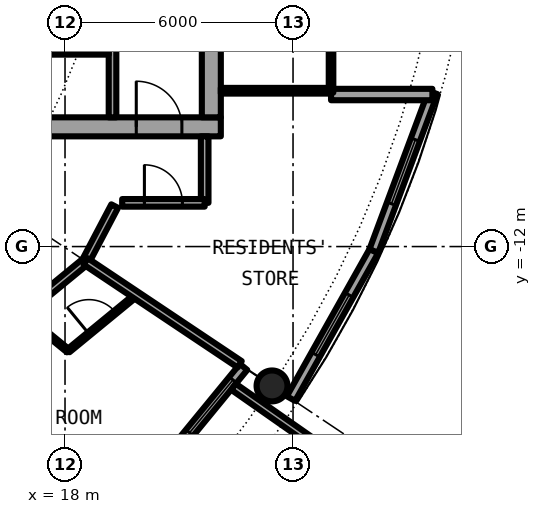
"""IFC4 building model, lengths in metres.
Left out: names, types, materials, properties, quantities, classifications, styles, units other than length and angle.
Written with IfcOpenShell. Run it as: python <this file> out.ifc"""

import sys

from ifc_helpers import new_model, si_unit, direction, frame, frame_2d, origin, origin_2d, place, context, subcontext, project, spatial, rectangle, hollow_circle, extrude, element, fill, save


model = new_model("IFC4")
c1 = context("Model", 3, precision=1e-05, world=origin(), true_north=direction((0.0, 1.0)))
c2 = subcontext(c1, "Body", "Model", "MODEL_VIEW")
j1 = project(units=[si_unit("LENGTHUNIT", "METRE"), si_unit("PLANEANGLEUNIT", "RADIAN")], contexts=[c1])
p1 = place(None, origin())
s1 = spatial("IfcSite", under=j1, at=p1, CompositionType="ELEMENT")
p2 = place(p1, origin())
s2 = spatial("IfcBuilding", under=s1, at=p2, CompositionType="ELEMENT")
p3 = place(p2, frame((0.0, 0.0, 154.35)))
s3 = spatial("IfcBuildingStorey", under=s2, at=p3, CompositionType="ELEMENT", Elevation=154.35)
p4 = place(p3, frame((23.448, -15.667, 0.0), z_axis=(0.0, 0.0, 1.0), x_axis=(1.0, 0.0, 0.0)))
e1 = element("IfcColumn", 1, at=p4, inside=s3, PredefinedType="COLUMN", context=c2, shape_type="SweptSolid", body=[
    extrude(hollow_circle(Radius=0.406, WallThickness=0.04, at=origin_2d()), origin(), (0.0, 0.0, 1.0), 3.05),
])
p5 = place(p3, frame((19.304, -19.304, 0.0), z_axis=(0.0, 0.0, 1.0), x_axis=(0.634382322723, 0.773019449054, 0.0)))
e2 = element("IfcWall", 2, at=p5, inside=s3, PredefinedType="SOLIDWALL", context=c2, shape_type="SweptSolid", body=[
    extrude(rectangle(XDim=5.352, YDim=0.25, at=frame_2d((2.676, 0.0))), origin(), (0.0, 0.0, 1.0), 2.7),
])
p6 = place(p5, frame((0.841, 0.0, 0.0)))
e3 = element("IfcOpeningElement", 3, at=p6, cuts=e2, PredefinedType="OPENING", context=c2, shape_type="SweptSolid", body=[
    extrude(rectangle(XDim=1.0, YDim=2.2, at=frame_2d((0.5, 1.1))), frame((0.0, 0.135, 0.0), z_axis=(0.0, -1.0, 0.0), x_axis=(1.0, 0.0, 0.0)), (0.0, 0.0, 1.0), 0.27),
])
p7 = place(p5, frame((3.111, 0.0, 0.3)))
e4 = element("IfcOpeningElement", 4, at=p7, cuts=e2, PredefinedType="OPENING", context=c2, shape_type="SweptSolid", body=[
    extrude(rectangle(XDim=1.8, YDim=2.1, at=frame_2d((0.9, 1.05))), frame((0.0, 0.135, 0.0), z_axis=(0.0, -1.0, 0.0), x_axis=(1.0, 0.0, 0.0)), (0.0, 0.0, 1.0), 0.27),
])
p8 = place(p3, frame((22.433, -15.688, -0.03), z_axis=(0.0, 0.0, 1.0), x_axis=(0.819373043115, -0.573260687834, 0.0)))
e5 = element("IfcWall", 5, at=p8, inside=s3, PredefinedType="SOLIDWALL", context=c2, shape_type="SweptSolid", body=[
    extrude(rectangle(XDim=2.925, YDim=0.2, at=frame_2d((1.463, 0.0))), origin(), (0.0, 0.0, 1.0), 2.73),
])
p9 = place(p3, frame((23.946, -16.0, 0.0), z_axis=(0.0, 0.0, 1.0), x_axis=(0.489696356642, 0.871893042919, 0.0)))
e6 = element("IfcWall", 6, at=p9, inside=s3, PredefinedType="SOLIDWALL", context=c2, shape_type="SweptSolid", body=[
    extrude(rectangle(XDim=4.454, YDim=0.25, at=frame_2d((2.227, 0.0))), origin(), (0.0, 0.0, 1.0), 2.7),
])
p10 = place(p9, frame((1.327, 0.0, 0.3)))
e7 = element("IfcOpeningElement", 7, at=p10, cuts=e6, PredefinedType="OPENING", context=c2, shape_type="SweptSolid", body=[
    extrude(rectangle(XDim=1.8, YDim=2.1, at=frame_2d((0.9, 1.05))), frame((0.0, 0.135, 0.0), z_axis=(0.0, -1.0, 0.0), x_axis=(1.0, 0.0, 0.0)), (0.0, 0.0, 1.0), 0.27),
])
p11 = place(p3, frame((26.127, -12.117, 0.0), z_axis=(0.0, 0.0, 1.0), x_axis=(0.349247811493, 0.937030397675, 0.0)))
e8 = element("IfcWall", 8, at=p11, inside=s3, PredefinedType="SOLIDWALL", context=c2, shape_type="SweptSolid", body=[
    extrude(rectangle(XDim=4.452, YDim=0.25, at=frame_2d((2.226, 0.0))), origin(), (0.0, 0.0, 1.0), 2.7),
])
p12 = place(p11, frame((1.327, 0.0, 0.3)))
e9 = element("IfcOpeningElement", 9, at=p12, cuts=e8, PredefinedType="OPENING", context=c2, shape_type="SweptSolid", body=[
    extrude(rectangle(XDim=1.8, YDim=2.1, at=frame_2d((0.9, 1.05))), frame((0.0, 0.135, 0.0), z_axis=(0.0, -1.0, 0.0), x_axis=(1.0, 0.0, 0.0)), (0.0, 0.0, 1.0), 0.27),
])
p13 = place(p3, frame((25.0, -8.0, 0.0), z_axis=(0.0, 0.0, 1.0), x_axis=(1.0, 0.0, 0.0)))
e10 = element("IfcWall", 10, at=p13, inside=s3, PredefinedType="SOLIDWALL", context=c2, shape_type="SweptSolid", body=[
    extrude(rectangle(XDim=2.667, YDim=0.3, at=frame_2d((1.333, 0.0))), origin(), (0.0, 0.0, 1.0), 2.7),
])
p14 = place(p3, frame((8.5, -8.85, 0.0), z_axis=(0.0, 0.0, 1.0), x_axis=(1.0, 0.0, 0.0)))
e11 = element("IfcWall", 11, at=p14, inside=s3, PredefinedType="SHEAR", context=c2, shape_type="SweptSolid", body=[
    extrude(rectangle(XDim=13.6, YDim=0.5, at=frame_2d((6.8, 0.0))), origin(), (0.0, 0.0, 1.0), 3.05),
])
p15 = place(p14, frame((11.375, 0.0, 0.0)))
e12 = element("IfcOpeningElement", 12, at=p15, cuts=e11, PredefinedType="OPENING", context=c2, shape_type="SweptSolid", body=[
    extrude(rectangle(XDim=1.2, YDim=2.3, at=frame_2d((0.6, 1.15))), frame((0.0, 0.26, 0.0), z_axis=(0.0, -1.0, 0.0), x_axis=(1.0, 0.0, 0.0)), (0.0, 0.0, 1.0), 0.52),
])
p16 = place(p3, frame((21.85, 8.6, 0.0), z_axis=(0.0, 0.0, 1.0), x_axis=(0.0, -1.0, 0.0)))
e13 = element("IfcWall", 13, at=p16, inside=s3, PredefinedType="SHEAR", context=c2, shape_type="SweptSolid", body=[
    extrude(rectangle(XDim=17.2, YDim=0.5, at=frame_2d((8.6, 0.0))), origin(), (0.0, 0.0, 1.0), 3.05),
])
p17 = place(p16, frame((7.7, 0.0, 0.0)))
e14 = element("IfcOpeningElement", 14, at=p17, cuts=e13, PredefinedType="OPENING", context=c2, shape_type="SweptSolid", body=[
    extrude(rectangle(XDim=1.8, YDim=2.3, at=frame_2d((0.9, 1.15))), frame((0.0, 0.26, 0.0), z_axis=(0.0, -1.0, 0.0), x_axis=(1.0, 0.0, 0.0)), (0.0, 0.0, 1.0), 0.52),
])
p18 = place(p3, frame((19.25, -8.6, 0.0), z_axis=(0.0, 0.0, 1.0), x_axis=(0.0, 1.0, 0.0)))
e15 = element("IfcWall", 15, at=p18, inside=s3, PredefinedType="SOLIDWALL", context=c2, shape_type="SweptSolid", body=[
    extrude(rectangle(XDim=7.025, YDim=0.2, at=frame_2d((3.513, 0.0))), origin(), (0.0, 0.0, 1.0), 2.7),
])
p19 = place(p18, frame((2.35, 0.0, 0.0)))
e16 = element("IfcOpeningElement", 16, at=p19, cuts=e15, PredefinedType="OPENING", context=c2, shape_type="SweptSolid", body=[
    extrude(rectangle(XDim=1.1, YDim=2.3, at=frame_2d((0.55, 1.15))), frame((0.0, 0.11, 0.0), z_axis=(0.0, -1.0, 0.0), x_axis=(1.0, 0.0, 0.0)), (0.0, 0.0, 1.0), 0.22),
])
p20 = place(p3, frame((15.45, -6.875, 0.0), z_axis=(0.0, 0.0, 1.0), x_axis=(1.0, 0.0, 0.0)))
e17 = element("IfcWall", 17, at=p20, inside=s3, PredefinedType="PARTITIONING", context=c2, shape_type="SweptSolid", body=[
    extrude(rectangle(XDim=3.7, YDim=0.15, at=frame_2d((1.85, 0.0))), origin(), (0.0, 0.0, 1.0), 2.7),
])
p21 = place(p20, frame((1.4, 0.0, 0.0)))
e18 = element("IfcOpeningElement", 18, at=p21, cuts=e17, PredefinedType="OPENING", context=c2, shape_type="SweptSolid", body=[
    extrude(rectangle(XDim=0.9, YDim=2.3, at=frame_2d((0.45, 1.15))), frame((0.0, 0.085, 0.0), z_axis=(0.0, -1.0, 0.0), x_axis=(1.0, 0.0, 0.0)), (0.0, 0.0, 1.0), 0.17),
])
p22 = place(p3, frame((22.1, -7.9, 0.0), z_axis=(0.0, 0.0, 1.0), x_axis=(1.0, 0.0, 0.0)))
e19 = element("IfcWall", 19, at=p22, inside=s3, PredefinedType="PARTITIONING", context=c2, shape_type="SweptSolid", body=[
    extrude(rectangle(XDim=2.84, YDim=0.15, at=frame_2d((1.42, 0.0))), origin(), (0.0, 0.0, 1.0), 2.7),
])
p23 = place(p3, frame((25.0, -7.95, 0.0), z_axis=(0.0, 0.0, 1.0), x_axis=(0.0, 1.0, 0.0)))
e20 = element("IfcWall", 20, at=p23, inside=s3, PredefinedType="PARTITIONING", context=c2, shape_type="SweptSolid", body=[
    extrude(rectangle(XDim=15.9, YDim=0.12, at=frame_2d((7.95, 0.0))), origin(), (0.0, 0.0, 1.0), 2.7),
])
p24 = place(p23, frame((0.95, 0.0, 0.1)))
e21 = element("IfcOpeningElement", 21, at=p24, cuts=e20, PredefinedType="OPENING", context=c2, shape_type="SweptSolid", body=[
    extrude(rectangle(XDim=14.0, YDim=2.35, at=frame_2d((7.0, 1.175))), frame((0.0, 0.07, 0.0), z_axis=(0.0, -1.0, 0.0), x_axis=(1.0, 0.0, 0.0)), (0.0, 0.0, 1.0), 0.14),
])
p25 = place(p3, frame((18.087, -14.742, 0.0), z_axis=(0.0, 0.0, 1.0), x_axis=(0.77288890179, 0.634541366256, 0.0)))
e22 = element("IfcWall", 22, at=p25, inside=s3, PredefinedType="PARTITIONING", context=c2, shape_type="SweptSolid", body=[
    extrude(rectangle(XDim=2.313, YDim=0.1, at=frame_2d((1.157, 0.0))), origin(), (0.0, 0.0, 1.0), 2.7),
])
p26 = place(p25, frame((0.702, 0.0, 0.0)))
e23 = element("IfcOpeningElement", 23, at=p26, cuts=e22, PredefinedType="OPENING", context=c2, shape_type="SweptSolid", body=[
    extrude(rectangle(XDim=0.9, YDim=2.3, at=frame_2d((0.45, 1.15))), frame((0.0, 0.06, 0.0), z_axis=(0.0, -1.0, 0.0), x_axis=(1.0, 0.0, 0.0)), (0.0, 0.0, 1.0), 0.12),
])
p27 = place(p3, frame((18.542, -12.389, 0.0), z_axis=(0.0, 0.0, 1.0), x_axis=(0.465605550524, 0.884992356646, 0.0)))
e24 = element("IfcWall", 24, at=p27, inside=s3, PredefinedType="PARTITIONING", context=c2, shape_type="SweptSolid", body=[
    extrude(rectangle(XDim=1.643, YDim=0.2, at=frame_2d((0.821, 0.0))), origin(), (0.0, 0.0, 1.0), 2.7),
])
p28 = place(p3, frame((21.675, -10.85, 0.0), z_axis=(0.0, 0.0, 1.0), x_axis=(0.0, 1.0, 0.0)))
e25 = element("IfcWall", 25, at=p28, inside=s3, PredefinedType="PARTITIONING", context=c2, shape_type="SweptSolid", body=[
    extrude(rectangle(XDim=1.75, YDim=0.2, at=frame_2d((0.875, 0.0))), origin(), (0.0, 0.0, 1.0), 2.7),
])
p29 = place(p3, frame((8.534, -20.603, 0.0), z_axis=(0.0, 0.0, 1.0), x_axis=(0.772983503654, 0.634426121056, 0.0)))
e26 = element("IfcWall", 26, at=p29, inside=s3, PredefinedType="PARTITIONING", context=c2, shape_type="SweptSolid", body=[
    extrude(rectangle(XDim=12.947, YDim=0.2, at=frame_2d((6.474, 0.0))), origin(), (0.0, 0.0, 1.0), 2.7),
])
p30 = place(p29, frame((4.895, 0.0, 0.0)))
e27 = element("IfcOpeningElement", 27, at=p30, cuts=e26, PredefinedType="OPENING", context=c2, shape_type="SweptSolid", body=[
    extrude(rectangle(XDim=1.0, YDim=2.3, at=frame_2d((0.5, 1.15))), frame((0.0, 0.11, 0.0), z_axis=(0.0, -1.0, 0.0), x_axis=(1.0, 0.0, 0.0)), (0.0, 0.0, 1.0), 0.22),
])
p31 = place(p3, frame((19.504, -10.85, 0.0), z_axis=(0.0, 0.0, 1.0), x_axis=(1.0, 0.0, 0.0)))
e28 = element("IfcWall", 28, at=p31, inside=s3, PredefinedType="PARTITIONING", context=c2, shape_type="SweptSolid", body=[
    extrude(rectangle(XDim=2.171, YDim=0.2, at=frame_2d((1.085, 0.0))), origin(), (0.0, 0.0, 1.0), 2.7),
])
p32 = place(p31, frame((0.585, 0.0, 0.0)))
e29 = element("IfcOpeningElement", 29, at=p32, cuts=e28, PredefinedType="OPENING", context=c2, shape_type="SweptSolid", body=[
    extrude(rectangle(XDim=1.0, YDim=2.3, at=frame_2d((0.5, 1.15))), frame((0.0, 0.11, 0.0), z_axis=(0.0, -1.0, 0.0), x_axis=(1.0, 0.0, 0.0)), (0.0, 0.0, 1.0), 0.22),
])
p33 = place(p3, frame((16.874, -13.758, 0.0), z_axis=(0.0, 0.0, 1.0), x_axis=(0.774869051393, -0.632121786679, 0.0)))
e30 = element("IfcWall", 30, at=p33, inside=s3, PredefinedType="PARTITIONING", context=c2, shape_type="SweptSolid", body=[
    extrude(rectangle(XDim=1.562, YDim=0.1, at=frame_2d((0.781, 0.0))), origin(), (0.0, 0.0, 1.0), 2.7),
])
p34 = place(p3, frame((18.542, -12.389, 0.0), z_axis=(0.0, 0.0, 1.0), x_axis=(0.831387096605, -0.55569370664, 0.0)))
e31 = element("IfcWall", 31, at=p34, inside=s3, PredefinedType="PARTITIONING", context=c2, shape_type="SweptSolid", body=[
    extrude(rectangle(XDim=4.875, YDim=0.2, at=frame_2d((2.438, 0.0))), origin(), (0.0, 0.0, 1.0), 2.7),
])
p35 = place(p7, origin())
e32 = element("IfcWindow", 32, at=p35, inside=s3, PartitioningType="SINGLE_PANEL", PredefinedType="WINDOW", context=c2, shape_type="SweptSolid", body=[
    extrude(rectangle(XDim=1.8, YDim=2.1, at=frame_2d((0.9, 1.05))), frame((0.0, 0.03, 0.0), z_axis=(0.0, -1.0, 0.0), x_axis=(1.0, 0.0, 0.0)), (0.0, 0.0, 1.0), 0.06),
])
fill(e4, e32)
p36 = place(p10, origin())
e33 = element("IfcWindow", 33, at=p36, inside=s3, PartitioningType="SINGLE_PANEL", PredefinedType="WINDOW", context=c2, shape_type="SweptSolid", body=[
    extrude(rectangle(XDim=1.8, YDim=2.1, at=frame_2d((0.9, 1.05))), frame((0.0, 0.03, 0.0), z_axis=(0.0, -1.0, 0.0), x_axis=(1.0, 0.0, 0.0)), (0.0, 0.0, 1.0), 0.06),
])
fill(e7, e33)
p37 = place(p12, origin())
e34 = element("IfcWindow", 34, at=p37, inside=s3, PartitioningType="SINGLE_PANEL", PredefinedType="WINDOW", context=c2, shape_type="SweptSolid", body=[
    extrude(rectangle(XDim=1.8, YDim=2.1, at=frame_2d((0.9, 1.05))), frame((0.0, 0.03, 0.0), z_axis=(0.0, -1.0, 0.0), x_axis=(1.0, 0.0, 0.0)), (0.0, 0.0, 1.0), 0.06),
])
fill(e9, e34)
p38 = place(p21, origin())
e35 = element("IfcDoor", 35, at=p38, inside=s3, OperationType="SINGLE_SWING_LEFT", PredefinedType="DOOR", context=c2, shape_type="SweptSolid", body=[
    extrude(rectangle(XDim=0.9, YDim=2.3, at=frame_2d((0.45, 1.15))), frame((0.0, 0.025, 0.0), z_axis=(0.0, -1.0, 0.0), x_axis=(1.0, 0.0, 0.0)), (0.0, 0.0, 1.0), 0.05),
])
fill(e18, e35)
p39 = place(p15, origin())
e36 = element("IfcDoor", 36, at=p39, inside=s3, OperationType="SINGLE_SWING_LEFT", PredefinedType="DOOR", context=c2, shape_type="SweptSolid", body=[
    extrude(rectangle(XDim=1.2, YDim=2.3, at=frame_2d((0.6, 1.15))), frame((0.0, 0.025, 0.0), z_axis=(0.0, -1.0, 0.0), x_axis=(1.0, 0.0, 0.0)), (0.0, 0.0, 1.0), 0.05),
])
fill(e12, e36)
p40 = place(p24, origin())
e37 = element("IfcWindow", 37, at=p40, inside=s3, PartitioningType="SINGLE_PANEL", PredefinedType="WINDOW", context=c2, shape_type="SweptSolid", body=[
    extrude(rectangle(XDim=14.0, YDim=2.35, at=frame_2d((7.0, 1.175))), frame((0.0, 0.03, 0.0), z_axis=(0.0, -1.0, 0.0), x_axis=(1.0, 0.0, 0.0)), (0.0, 0.0, 1.0), 0.06),
])
fill(e21, e37)
p41 = place(p26, origin())
e38 = element("IfcDoor", 38, at=p41, inside=s3, OperationType="SINGLE_SWING_LEFT", PredefinedType="DOOR", context=c2, shape_type="SweptSolid", body=[
    extrude(rectangle(XDim=0.9, YDim=2.3, at=frame_2d((0.45, 1.15))), frame((0.0, 0.025, 0.0), z_axis=(0.0, -1.0, 0.0), x_axis=(1.0, 0.0, 0.0)), (0.0, 0.0, 1.0), 0.05),
])
fill(e23, e38)
p42 = place(p32, origin())
e39 = element("IfcDoor", 39, at=p42, inside=s3, OperationType="SINGLE_SWING_LEFT", PredefinedType="DOOR", context=c2, shape_type="SweptSolid", body=[
    extrude(rectangle(XDim=1.0, YDim=2.3, at=frame_2d((0.5, 1.15))), frame((0.0, 0.025, 0.0), z_axis=(0.0, -1.0, 0.0), x_axis=(1.0, 0.0, 0.0)), (0.0, 0.0, 1.0), 0.05),
])
fill(e29, e39)
save(model, sys.argv[1])
